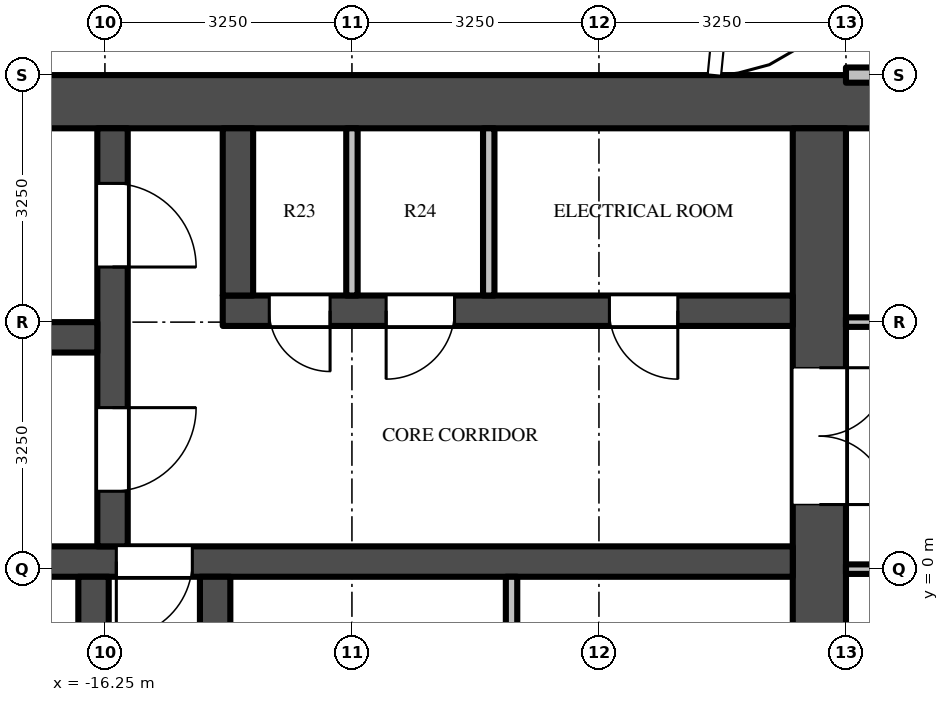
"""IFC4 building model, lengths in metres.
Left out: names, types, materials, properties, quantities, classifications, styles, units other than length and angle.
Written with IfcOpenShell. Run it as: python <this file> out.ifc"""

import sys

from ifc_helpers import new_model, si_unit, direction, frame, frame_2d, origin, place, context, subcontext, project, spatial, rectangle, extrude, source, transform, mapped, element, fill, save


model = new_model("IFC4")
c1 = context("Model", 3, precision=1e-05, world=origin(), true_north=direction((0.0, 1.0)))
c2 = subcontext(c1, "Body", "Model", "MODEL_VIEW")
j1 = project(units=[si_unit("LENGTHUNIT", "METRE"), si_unit("PLANEANGLEUNIT", "RADIAN")], contexts=[c1])
p1 = place(None, origin())
s1 = spatial("IfcSite", under=j1, at=p1, CompositionType="ELEMENT")
p2 = place(p1, origin())
s2 = spatial("IfcBuilding", under=s1, at=p2, CompositionType="ELEMENT")
p3 = place(p2, frame((0.0, 0.0, 346.1)))
s3 = spatial("IfcBuildingStorey", under=s2, at=p3, CompositionType="ELEMENT", Elevation=346.1)
m1 = source(origin(), c2, "Body", "SweptSolid", [
    extrude(rectangle(XDim=16.7, YDim=0.7, at=frame_2d((8.35, 0.0))), origin(), (0.0, 0.0, 1.0), 3.75),
])
p4 = place(p3, frame((-6.05, 6.15, 0.0), z_axis=(0.0, 0.0, 1.0), x_axis=(-1.0, 0.0, 0.0)))
e1 = element("IfcWall", 1, at=p4, inside=s3, PredefinedType="SHEAR", context=c2, shape_type="MappedRepresentation", body=[
    mapped(m1, transform((0.0, 0.0, 0.0))),
])
m2 = source(origin(), c2, "Body", "SweptSolid", [
    extrude(rectangle(XDim=9.05, YDim=0.7, at=frame_2d((4.525, 0.0))), origin(), (0.0, 0.0, 1.0), 3.75),
])
p5 = place(p3, frame((-6.85, 5.8, 0.0), z_axis=(0.0, 0.0, 1.0), x_axis=(0.0, -1.0, 0.0)))
e2 = element("IfcWall", 2, at=p5, inside=s3, PredefinedType="SHEAR", context=c2, shape_type="MappedRepresentation", body=[
    mapped(m2, transform((0.0, 0.0, 0.0))),
])
m3 = source(origin(), c2, "Body", "SweptSolid", [
    extrude(rectangle(XDim=1.8, YDim=2.1, at=frame_2d((0.9, 1.05))), frame((0.0, 0.36, 0.0), z_axis=(0.0, -1.0, 0.0), x_axis=(1.0, 0.0, 0.0)), (0.0, 0.0, 1.0), 0.72),
])
p6 = place(p5, frame((3.15, 0.0, 0.0)))
e3 = element("IfcOpeningElement", 3, at=p6, cuts=e2, PredefinedType="OPENING", context=c2, shape_type="MappedRepresentation", body=[
    mapped(m3, transform((0.0, 0.0, 0.0))),
])
m4 = source(origin(), c2, "Body", "SweptSolid", [
    extrude(rectangle(XDim=7.5, YDim=0.4, at=frame_2d((3.75, 0.0))), origin(), (0.0, 0.0, 1.0), 3.75),
])
p7 = place(p3, frame((-7.2, 3.4, 0.0), z_axis=(0.0, 0.0, 1.0), x_axis=(-1.0, 0.0, 0.0)))
e4 = element("IfcWall", 4, at=p7, inside=s3, PredefinedType="SHEAR", context=c2, shape_type="MappedRepresentation", body=[
    mapped(m4, transform((0.0, 0.0, 0.0))),
])
m5 = source(origin(), c2, "Body", "SweptSolid", [
    extrude(rectangle(XDim=0.9, YDim=2.1, at=frame_2d((0.45, 1.05))), frame((0.0, 0.21, 0.0), z_axis=(0.0, -1.0, 0.0), x_axis=(1.0, 0.0, 0.0)), (0.0, 0.0, 1.0), 0.42),
])
p8 = place(p7, frame((1.512, 0.0, 0.0)))
e5 = element("IfcOpeningElement", 5, at=p8, cuts=e4, PredefinedType="OPENING", context=c2, shape_type="MappedRepresentation", body=[
    mapped(m5, transform((0.0, 0.0, 0.0))),
])
p9 = place(p7, frame((4.45, 0.0, 0.0)))
e6 = element("IfcOpeningElement", 6, at=p9, cuts=e4, PredefinedType="OPENING", context=c2, shape_type="MappedRepresentation", body=[
    mapped(m5, transform((0.0, 0.0, 0.0))),
])
m6 = source(origin(), c2, "Body", "SweptSolid", [
    extrude(rectangle(XDim=0.8, YDim=2.1, at=frame_2d((0.4, 1.05))), frame((0.0, 0.21, 0.0), z_axis=(0.0, -1.0, 0.0), x_axis=(1.0, 0.0, 0.0)), (0.0, 0.0, 1.0), 0.42),
])
p10 = place(p7, frame((6.087, 0.0, 0.0)))
e7 = element("IfcOpeningElement", 7, at=p10, cuts=e4, PredefinedType="OPENING", context=c2, shape_type="MappedRepresentation", body=[
    mapped(m6, transform((0.0, 0.0, 0.0))),
])
m7 = source(origin(), c2, "Body", "SweptSolid", [
    extrude(rectangle(XDim=14.85, YDim=0.4, at=frame_2d((7.425, 0.0))), origin(), (0.0, 0.0, 1.0), 3.75),
])
p11 = place(p3, frame((-7.2, 0.1, 0.0), z_axis=(0.0, 0.0, 1.0), x_axis=(-1.0, 0.0, 0.0)))
e8 = element("IfcWall", 8, at=p11, inside=s3, PredefinedType="SHEAR", context=c2, shape_type="MappedRepresentation", body=[
    mapped(m7, transform((0.0, 0.0, 0.0))),
])
m8 = source(origin(), c2, "Body", "SweptSolid", [
    extrude(rectangle(XDim=1.0, YDim=2.1, at=frame_2d((0.5, 1.05))), frame((0.0, 0.21, 0.0), z_axis=(0.0, -1.0, 0.0), x_axis=(1.0, 0.0, 0.0)), (0.0, 0.0, 1.0), 0.42),
])
p12 = place(p11, frame((7.9, 0.0, 0.0)))
e9 = element("IfcOpeningElement", 9, at=p12, cuts=e8, PredefinedType="OPENING", context=c2, shape_type="MappedRepresentation", body=[
    mapped(m8, transform((0.0, 0.0, 0.0))),
])
m9 = source(origin(), c2, "Body", "SweptSolid", [
    extrude(rectangle(XDim=5.5, YDim=0.4, at=frame_2d((2.75, 0.0))), origin(), (0.0, 0.0, 1.0), 3.75),
])
p13 = place(p3, frame((-16.15, 5.8, 0.0), z_axis=(0.0, 0.0, 1.0), x_axis=(0.0, -1.0, 0.0)))
e10 = element("IfcWall", 10, at=p13, inside=s3, PredefinedType="SHEAR", context=c2, shape_type="MappedRepresentation", body=[
    mapped(m9, transform((0.0, 0.0, 0.0))),
])
m10 = source(origin(), c2, "Body", "SweptSolid", [
    extrude(rectangle(XDim=1.1, YDim=2.1, at=frame_2d((0.55, 1.05))), frame((0.0, 0.21, 0.0), z_axis=(0.0, -1.0, 0.0), x_axis=(1.0, 0.0, 0.0)), (0.0, 0.0, 1.0), 0.42),
])
p14 = place(p13, frame((0.725, 0.0, 0.0)))
e11 = element("IfcOpeningElement", 11, at=p14, cuts=e10, PredefinedType="OPENING", context=c2, shape_type="MappedRepresentation", body=[
    mapped(m10, transform((0.0, 0.0, 0.0))),
])
p15 = place(p13, frame((3.675, 0.0, 0.0)))
e12 = element("IfcOpeningElement", 12, at=p15, cuts=e10, PredefinedType="OPENING", context=c2, shape_type="MappedRepresentation", body=[
    mapped(m10, transform((0.0, 0.0, 0.0))),
])
m11 = source(origin(), c2, "Body", "SweptSolid", [
    extrude(rectangle(XDim=5.7, YDim=0.4, at=frame_2d((2.85, 0.0))), origin(), (0.0, 0.0, 1.0), 3.75),
])
p16 = place(p3, frame((-16.35, 3.05, 0.0), z_axis=(0.0, 0.0, 1.0), x_axis=(-1.0, 0.0, 0.0)))
e13 = element("IfcWall", 13, at=p16, inside=s3, PredefinedType="SHEAR", context=c2, shape_type="MappedRepresentation", body=[
    mapped(m11, transform((0.0, 0.0, 0.0))),
])
m12 = source(origin(), c2, "Body", "SweptSolid", [
    extrude(rectangle(XDim=2.2, YDim=0.4, at=frame_2d((1.1, 0.0))), origin(), (0.0, 0.0, 1.0), 3.75),
])
p17 = place(p3, frame((-14.5, 5.8, 0.0), z_axis=(0.0, 0.0, 1.0), x_axis=(0.0, -1.0, 0.0)))
e14 = element("IfcWall", 14, at=p17, inside=s3, PredefinedType="SHEAR", context=c2, shape_type="MappedRepresentation", body=[
    mapped(m12, transform((0.0, 0.0, 0.0))),
])
m13 = source(origin(), c2, "Body", "SweptSolid", [
    extrude(rectangle(XDim=2.45, YDim=0.4, at=frame_2d((1.225, 0.0))), origin(), (0.0, 0.0, 1.0), 3.75),
])
for number, where, z_axis, x_axis in (
    (15, (-14.8, -0.1, 0.0), (0.0, 0.0, 1.0), (0.0, -1.0, 0.0)),
    (16, (-16.4, -0.1, 0.0), (0.0, 0.0, 1.0), (0.0, -1.0, 0.0)),
):
    element("IfcWall", number, at=place(p3, frame(where, z_axis=z_axis, x_axis=x_axis)), inside=s3, PredefinedType="SHEAR", context=c2, shape_type="MappedRepresentation", body=[
        mapped(m13, transform((0.0, 0.0, 0.0))),
    ])
m14 = source(origin(), c2, "Body", "SweptSolid", [
    extrude(rectangle(XDim=2.2, YDim=0.15, at=frame_2d((1.1, 0.0))), origin(), (0.0, 0.0, 1.0), 3.75),
])
for number, where, z_axis, x_axis in (
    (17, (-11.2, 5.8, 0.0), (0.0, 0.0, 1.0), (0.0, -1.0, 0.0)),
    (18, (-13.0, 5.8, 0.0), (0.0, 0.0, 1.0), (0.0, -1.0, 0.0)),
):
    element("IfcWall", number, at=place(p3, frame(where, z_axis=z_axis, x_axis=x_axis)), inside=s3, PredefinedType="PARTITIONING", context=c2, shape_type="MappedRepresentation", body=[
        mapped(m14, transform((0.0, 0.0, 0.0))),
    ])
m15 = source(origin(), c2, "Body", "SweptSolid", [
    extrude(rectangle(XDim=2.45, YDim=0.15, at=frame_2d((1.225, 0.0))), origin(), (0.0, 0.0, 1.0), 3.75),
])
p18 = place(p3, frame((-10.9, -0.1, 0.0), z_axis=(0.0, 0.0, 1.0), x_axis=(0.0, -1.0, 0.0)))
e19 = element("IfcWall", 19, at=p18, inside=s3, PredefinedType="PARTITIONING", context=c2, shape_type="MappedRepresentation", body=[
    mapped(m15, transform((0.0, 0.0, 0.0))),
])
m16 = source(origin(), c2, "Body", "SweptSolid", [
    extrude(rectangle(XDim=5.363, YDim=0.125, at=frame_2d((2.681, 0.0))), origin(), (0.0, 0.0, 1.0), 3.046),
])
p19 = place(p3, frame((-1.137, 0.0, 0.0), z_axis=(0.0, 0.0, 1.0), x_axis=(-1.0, 0.0, 0.0)))
e20 = element("IfcWall", 20, at=p19, inside=s3, PredefinedType="PARTITIONING", context=c2, shape_type="MappedRepresentation", body=[
    mapped(m16, transform((0.0, 0.0, 0.0))),
])
p20 = place(p3, frame((-6.5, 3.25, 0.0), z_axis=(0.0, 0.0, 1.0), x_axis=(1.0, 0.0, 0.0)))
e21 = element("IfcWall", 21, at=p20, inside=s3, PredefinedType="PARTITIONING", context=c2, shape_type="MappedRepresentation", body=[
    mapped(m16, transform((0.0, 0.0, 0.0))),
])
m17 = source(origin(), c2, "Body", "SweptSolid", [
    extrude(rectangle(XDim=1.0, YDim=2.1, at=frame_2d((0.5, 1.05))), frame((0.0, 0.073, 0.0), z_axis=(0.0, -1.0, 0.0), x_axis=(1.0, 0.0, 0.0)), (0.0, 0.0, 1.0), 0.145),
])
p21 = place(p20, frame((3.95, 0.0, 0.0)))
e22 = element("IfcOpeningElement", 22, at=p21, cuts=e21, PredefinedType="OPENING", context=c2, shape_type="MappedRepresentation", body=[
    mapped(m17, transform((0.0, 0.0, 0.0))),
])
m18 = source(origin(), c2, "Body", "SweptSolid", [
    extrude(rectangle(XDim=5.363, YDim=0.2, at=frame_2d((2.681, 0.0))), origin(), (0.0, 0.0, 1.0), 2.83),
])
p22 = place(p3, frame((-6.5, 6.5, 0.0), z_axis=(0.0, 0.0, 1.0), x_axis=(1.0, 0.0, 0.0)))
e23 = element("IfcWall", 23, at=p22, inside=s3, PredefinedType="PARTITIONING", context=c2, shape_type="MappedRepresentation", body=[
    mapped(m18, transform((0.0, 0.0, 0.0))),
])
m19 = source(origin(), c2, "Body", "SweptSolid", [
    extrude(rectangle(XDim=1.8, YDim=2.1, at=frame_2d((0.9, 1.05))), frame((0.0, -0.275, 0.0), z_axis=(0.0, -1.0, 0.0), x_axis=(1.0, 0.0, 0.0)), (0.0, 0.0, 1.0), 0.05),
])
p23 = place(p6, origin())
e24 = element("IfcDoor", 24, at=p23, inside=s3, OperationType="DOUBLE_DOOR_SINGLE_SWING", PredefinedType="DOOR", context=c2, shape_type="MappedRepresentation", body=[
    mapped(m19, transform((0.0, 0.0, 0.0))),
])
fill(e3, e24)
m20 = source(origin(), c2, "Body", "SweptSolid", [
    extrude(rectangle(XDim=1.1, YDim=2.1, at=frame_2d((0.55, 1.05))), frame((0.0, 0.025, 0.0), z_axis=(0.0, -1.0, 0.0), x_axis=(1.0, 0.0, 0.0)), (0.0, 0.0, 1.0), 0.05),
])
p24 = place(p14, origin())
e25 = element("IfcDoor", 25, at=p24, inside=s3, OperationType="SINGLE_SWING_RIGHT", PredefinedType="DOOR", context=c2, shape_type="MappedRepresentation", body=[
    mapped(m20, transform((0.0, 0.0, 0.0))),
])
fill(e11, e25)
p25 = place(p15, origin())
e26 = element("IfcDoor", 26, at=p25, inside=s3, OperationType="SINGLE_SWING_LEFT", PredefinedType="DOOR", context=c2, shape_type="MappedRepresentation", body=[
    mapped(m20, transform((0.0, 0.0, 0.0))),
])
fill(e12, e26)
m21 = source(origin(), c2, "Body", "SweptSolid", [
    extrude(rectangle(XDim=1.0, YDim=2.1, at=frame_2d((0.5, 1.05))), frame((0.0, 0.025, 0.0), z_axis=(0.0, -1.0, 0.0), x_axis=(1.0, 0.0, 0.0)), (0.0, 0.0, 1.0), 0.05),
])
p26 = place(p12, origin())
e27 = element("IfcDoor", 27, at=p26, inside=s3, OperationType="SINGLE_SWING_RIGHT", PredefinedType="DOOR", context=c2, shape_type="MappedRepresentation", body=[
    mapped(m21, transform((0.0, 0.0, 0.0))),
])
fill(e9, e27)
m22 = source(origin(), c2, "Body", "SweptSolid", [
    extrude(rectangle(XDim=0.9, YDim=2.1, at=frame_2d((0.45, 1.05))), frame((0.0, 0.025, 0.0), z_axis=(0.0, -1.0, 0.0), x_axis=(1.0, 0.0, 0.0)), (0.0, 0.0, 1.0), 0.05),
])
p27 = place(p8, origin())
e28 = element("IfcDoor", 28, at=p27, inside=s3, OperationType="SINGLE_SWING_LEFT", PredefinedType="DOOR", context=c2, shape_type="MappedRepresentation", body=[
    mapped(m22, transform((0.0, 0.0, 0.0))),
])
fill(e5, e28)
p28 = place(p9, origin())
e29 = element("IfcDoor", 29, at=p28, inside=s3, OperationType="SINGLE_SWING_RIGHT", PredefinedType="DOOR", context=c2, shape_type="MappedRepresentation", body=[
    mapped(m22, transform((0.0, 0.0, 0.0))),
])
fill(e6, e29)
m23 = source(origin(), c2, "Body", "SweptSolid", [
    extrude(rectangle(XDim=0.8, YDim=2.1, at=frame_2d((0.4, 1.05))), frame((0.0, 0.025, 0.0), z_axis=(0.0, -1.0, 0.0), x_axis=(1.0, 0.0, 0.0)), (0.0, 0.0, 1.0), 0.05),
])
p29 = place(p10, origin())
e30 = element("IfcDoor", 30, at=p29, inside=s3, OperationType="SINGLE_SWING_LEFT", PredefinedType="DOOR", context=c2, shape_type="MappedRepresentation", body=[
    mapped(m23, transform((0.0, 0.0, 0.0))),
])
fill(e7, e30)
save(model, sys.argv[1])
